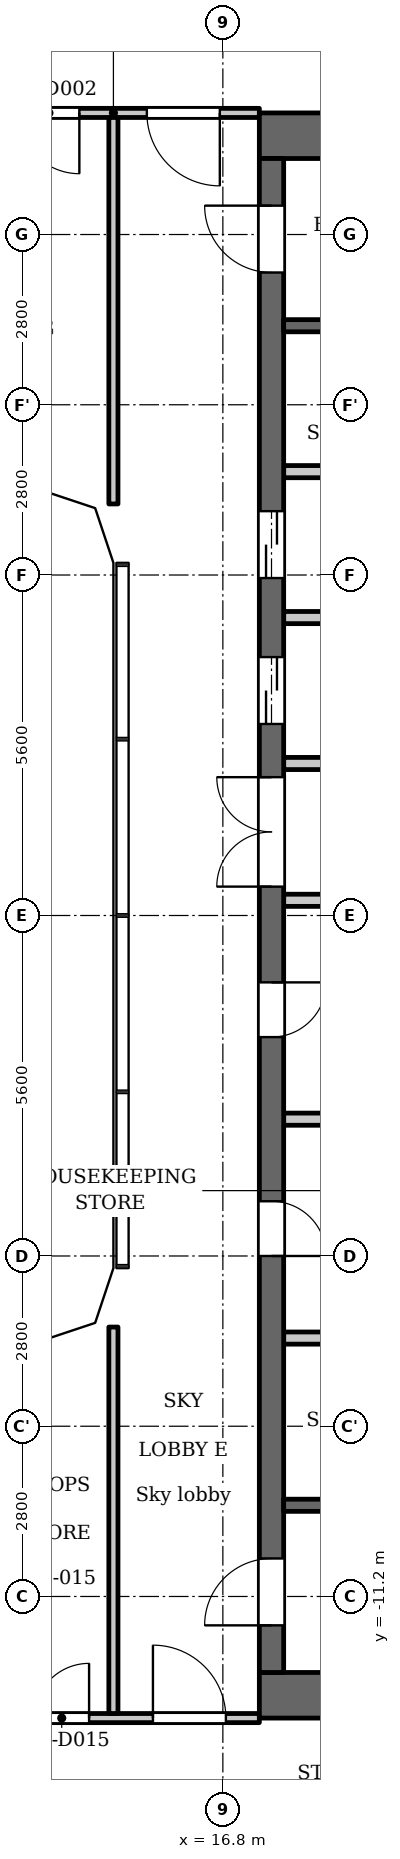
"""IFC4 building model, lengths in metres.
Left out: names, types, materials, properties, quantities, classifications, styles, units other than length and angle.
Written with IfcOpenShell. Run it as: python <this file> out.ifc"""

import sys

from ifc_helpers import new_model, si_unit, direction, frame, frame_2d, origin, place, context, subcontext, project, spatial, polyline, rectangle, outline, extrude, element, fill, save


model = new_model("IFC4")
c1 = context("Model", 3, precision=1e-05, world=origin(), true_north=direction((0.0, 1.0)))
c2 = subcontext(c1, "Body", "Model", "MODEL_VIEW")
j1 = project(units=[si_unit("LENGTHUNIT", "METRE"), si_unit("PLANEANGLEUNIT", "RADIAN")], contexts=[c1])
p1 = place(None, origin())
s1 = spatial("IfcSite", under=j1, at=p1, CompositionType="ELEMENT")
p2 = place(p1, origin())
s2 = spatial("IfcBuilding", under=s1, at=p2, CompositionType="ELEMENT")
p3 = place(p2, frame((0.0, 0.0, 178.1)))
s3 = spatial("IfcBuildingStorey", under=s2, at=p3, CompositionType="ELEMENT", Elevation=178.1)
for number, where, z_axis, x_axis in (
    (1, (17.4, 12.825, 0.0), (0.0, 0.0, 1.0), (1.0, 0.0, 0.0)),
    (2, (17.4, -12.825, 0.0), (0.0, 0.0, 1.0), (1.0, 0.0, 0.0)),
):
    element("IfcWall", number, at=place(p3, frame(where, z_axis=z_axis, x_axis=x_axis)), inside=s3, PredefinedType="SHEAR", context=c2, shape_type="SweptSolid", body=[
        extrude(rectangle(XDim=10.4, YDim=0.75, at=frame_2d((5.2, 0.0))), origin(), (0.0, 0.0, 1.0), 4.95),
    ])
p4 = place(p3, frame((17.8, -3.35, 0.0), z_axis=(0.0, 0.0, 1.0), x_axis=(1.0, 0.0, 0.0)))
e3 = element("IfcWall", 3, at=p4, inside=s3, PredefinedType="PARTITIONING", context=c2, shape_type="SweptSolid", body=[
    extrude(rectangle(XDim=2.8, YDim=0.2, at=frame_2d((1.4, 0.0))), origin(), (0.0, 0.0, 1.0), 4.95),
])
p5 = place(p3, frame((17.6, -12.45, 0.0), z_axis=(0.0, 0.0, 1.0), x_axis=(0.0, 1.0, 0.0)))
e4 = element("IfcWall", 4, at=p5, inside=s3, PredefinedType="SHEAR", context=c2, shape_type="SweptSolid", body=[
    extrude(rectangle(XDim=24.9, YDim=0.4, at=frame_2d((12.45, 0.0))), origin(), (0.0, 0.0, 1.0), 4.95),
])
p6 = place(p5, frame((6.85, 0.0, 0.0)))
e5 = element("IfcOpeningElement", 5, at=p6, cuts=e4, PredefinedType="OPENING", context=c2, shape_type="SweptSolid", body=[
    extrude(rectangle(XDim=0.9, YDim=2.1, at=frame_2d((0.45, 1.05))), frame((0.0, 0.21, 0.0), z_axis=(0.0, -1.0, 0.0), x_axis=(1.0, 0.0, 0.0)), (0.0, 0.0, 1.0), 0.42),
])
p7 = place(p5, frame((10.45, 0.0, 0.0)))
e6 = element("IfcOpeningElement", 6, at=p7, cuts=e4, PredefinedType="OPENING", context=c2, shape_type="SweptSolid", body=[
    extrude(rectangle(XDim=0.9, YDim=2.1, at=frame_2d((0.45, 1.05))), frame((0.0, 0.21, 0.0), z_axis=(0.0, -1.0, 0.0), x_axis=(1.0, 0.0, 0.0)), (0.0, 0.0, 1.0), 0.42),
])
p8 = place(p5, frame((15.6, 0.0, 0.0)))
e7 = element("IfcOpeningElement", 7, at=p8, cuts=e4, PredefinedType="OPENING", context=c2, shape_type="SweptSolid", body=[
    extrude(rectangle(XDim=1.1, YDim=2.1, at=frame_2d((0.55, 1.05))), frame((0.0, 0.21, 0.0), z_axis=(0.0, -1.0, 0.0), x_axis=(1.0, 0.0, 0.0)), (0.0, 0.0, 1.0), 0.42),
])
p9 = place(p5, frame((18.0, 0.0, 0.0)))
e8 = element("IfcOpeningElement", 8, at=p9, cuts=e4, PredefinedType="OPENING", context=c2, shape_type="SweptSolid", body=[
    extrude(rectangle(XDim=1.1, YDim=2.1, at=frame_2d((0.55, 1.05))), frame((0.0, 0.21, 0.0), z_axis=(0.0, -1.0, 0.0), x_axis=(1.0, 0.0, 0.0)), (0.0, 0.0, 1.0), 0.42),
])
p10 = place(p5, frame((23.025, 0.0, 0.0)))
e9 = element("IfcOpeningElement", 9, at=p10, cuts=e4, PredefinedType="OPENING", context=c2, shape_type="SweptSolid", body=[
    extrude(rectangle(XDim=1.1, YDim=2.1, at=frame_2d((0.55, 1.05))), frame((0.0, 0.21, 0.0), z_axis=(0.0, -1.0, 0.0), x_axis=(1.0, 0.0, 0.0)), (0.0, 0.0, 1.0), 0.42),
])
p11 = place(p5, frame((0.775, 0.0, 0.0)))
e10 = element("IfcOpeningElement", 10, at=p11, cuts=e4, PredefinedType="OPENING", context=c2, shape_type="SweptSolid", body=[
    extrude(rectangle(XDim=1.1, YDim=2.1, at=frame_2d((0.55, 1.05))), frame((0.0, 0.21, 0.0), z_axis=(0.0, -1.0, 0.0), x_axis=(1.0, 0.0, 0.0)), (0.0, 0.0, 1.0), 0.42),
])
p12 = place(p5, frame((12.925, 0.0, 0.0)))
e11 = element("IfcOpeningElement", 11, at=p12, cuts=e4, PredefinedType="OPENING", context=c2, shape_type="SweptSolid", body=[
    extrude(rectangle(XDim=1.8, YDim=2.1, at=frame_2d((0.9, 1.05))), frame((0.0, 0.21, 0.0), z_axis=(0.0, -1.0, 0.0), x_axis=(1.0, 0.0, 0.0)), (0.0, 0.0, 1.0), 0.42),
])
p13 = place(p3, frame((17.8, -9.7, 0.0), z_axis=(0.0, 0.0, 1.0), x_axis=(1.0, 0.0, 0.0)))
e12 = element("IfcWall", 12, at=p13, inside=s3, PredefinedType="SHEAR", context=c2, shape_type="SweptSolid", body=[
    extrude(rectangle(XDim=8.45, YDim=0.2, at=frame_2d((4.225, 0.0))), origin(), (0.0, 0.0, 1.0), 4.95),
])
p14 = place(p13, frame((0.85, 0.0, 0.0)))
e13 = element("IfcOpeningElement", 13, at=p14, cuts=e12, PredefinedType="OPENING", context=c2, shape_type="SweptSolid", body=[
    extrude(rectangle(XDim=1.1, YDim=2.1, at=frame_2d((0.55, 1.05))), frame((0.0, 0.11, 0.0), z_axis=(0.0, -1.0, 0.0), x_axis=(1.0, 0.0, 0.0)), (0.0, 0.0, 1.0), 0.22),
])
p15 = place(p13, frame((3.75, 0.0, 0.0)))
e14 = element("IfcOpeningElement", 14, at=p15, cuts=e12, PredefinedType="OPENING", context=c2, shape_type="SweptSolid", body=[
    extrude(rectangle(XDim=1.1, YDim=2.1, at=frame_2d((0.55, 1.05))), frame((0.0, 0.11, 0.0), z_axis=(0.0, -1.0, 0.0), x_axis=(1.0, 0.0, 0.0)), (0.0, 0.0, 1.0), 0.22),
])
p16 = place(p3, frame((17.8, -6.95, 0.0), z_axis=(0.0, 0.0, 1.0), x_axis=(1.0, 0.0, 0.0)))
e15 = element("IfcWall", 15, at=p16, inside=s3, PredefinedType="PARTITIONING", context=c2, shape_type="SweptSolid", body=[
    extrude(rectangle(XDim=2.8, YDim=0.2, at=frame_2d((1.4, 0.0))), origin(), (0.0, 0.0, 1.0), 4.95),
])
for number, where, z_axis, x_axis in (
    (16, (17.8, 0.25, 0.0), (0.0, 0.0, 1.0), (1.0, 0.0, 0.0)),
    (17, (17.8, 2.5, 0.0), (0.0, 0.0, 1.0), (1.0, 0.0, 0.0)),
):
    element("IfcWall", number, at=place(p3, frame(where, z_axis=z_axis, x_axis=x_axis)), inside=s3, PredefinedType="PARTITIONING", context=c2, shape_type="SweptSolid", body=[
        extrude(rectangle(XDim=3.0, YDim=0.2, at=frame_2d((1.5, 0.0))), origin(), (0.0, 0.0, 1.0), 4.95),
    ])
for number, where, z_axis, x_axis in (
    (18, (17.8, 4.9, 0.0), (0.0, 0.0, 1.0), (1.0, 0.0, 0.0)),
    (19, (17.8, 7.3, 0.0), (0.0, 0.0, 1.0), (1.0, 0.0, 0.0)),
):
    element("IfcWall", number, at=place(p3, frame(where, z_axis=z_axis, x_axis=x_axis)), inside=s3, PredefinedType="PARTITIONING", context=c2, shape_type="SweptSolid", body=[
        extrude(rectangle(XDim=2.8, YDim=0.2, at=frame_2d((1.4, 0.0))), origin(), (0.0, 0.0, 1.0), 4.95),
    ])
p17 = place(p3, frame((17.8, 9.7, 0.0), z_axis=(0.0, 0.0, 1.0), x_axis=(1.0, 0.0, 0.0)))
e20 = element("IfcWall", 20, at=p17, inside=s3, PredefinedType="SHEAR", context=c2, shape_type="SweptSolid", body=[
    extrude(rectangle(XDim=8.45, YDim=0.2, at=frame_2d((4.225, 0.0))), origin(), (0.0, 0.0, 1.0), 4.95),
])
p18 = place(p17, frame((0.85, 0.0, 0.0)))
e21 = element("IfcOpeningElement", 21, at=p18, cuts=e20, PredefinedType="OPENING", context=c2, shape_type="SweptSolid", body=[
    extrude(rectangle(XDim=1.1, YDim=2.1, at=frame_2d((0.55, 1.05))), frame((0.0, 0.11, 0.0), z_axis=(0.0, -1.0, 0.0), x_axis=(1.0, 0.0, 0.0)), (0.0, 0.0, 1.0), 0.22),
])
p19 = place(p17, frame((3.75, 0.0, 0.0)))
e22 = element("IfcOpeningElement", 22, at=p19, cuts=e20, PredefinedType="OPENING", context=c2, shape_type="SweptSolid", body=[
    extrude(rectangle(XDim=1.1, YDim=2.1, at=frame_2d((0.55, 1.05))), frame((0.0, 0.11, 0.0), z_axis=(0.0, -1.0, 0.0), x_axis=(1.0, 0.0, 0.0)), (0.0, 0.0, 1.0), 0.22),
])
p20 = place(p3, frame((11.384, -13.2, 0.0), z_axis=(0.0, 0.0, 1.0), x_axis=(1.0, 0.0, 0.0)))
e23 = element("IfcWall", 23, at=p20, inside=s3, PredefinedType="PARTITIONING", context=c2, shape_type="SweptSolid", body=[
    extrude(rectangle(XDim=6.016, YDim=0.15, at=frame_2d((3.008, 0.0))), origin(), (0.0, 0.0, 1.0), 4.95),
])
p21 = place(p20, frame((4.266, 0.0, 0.0)))
e24 = element("IfcOpeningElement", 24, at=p21, cuts=e23, PredefinedType="OPENING", context=c2, shape_type="SweptSolid", body=[
    extrude(rectangle(XDim=1.2, YDim=2.1, at=frame_2d((0.6, 1.05))), frame((0.0, 0.085, 0.0), z_axis=(0.0, -1.0, 0.0), x_axis=(1.0, 0.0, 0.0)), (0.0, 0.0, 1.0), 0.17),
])
p22 = place(p20, frame((0.416, 0.0, 0.0)))
e25 = element("IfcOpeningElement", 25, at=p22, cuts=e23, PredefinedType="OPENING", context=c2, shape_type="SweptSolid", body=[
    extrude(rectangle(XDim=0.9, YDim=2.1, at=frame_2d((0.45, 1.05))), frame((0.0, 0.085, 0.0), z_axis=(0.0, -1.0, 0.0), x_axis=(1.0, 0.0, 0.0)), (0.0, 0.0, 1.0), 0.17),
])
p23 = place(p20, frame((2.316, 0.0, 0.0)))
e26 = element("IfcOpeningElement", 26, at=p23, cuts=e23, PredefinedType="OPENING", context=c2, shape_type="SweptSolid", body=[
    extrude(rectangle(XDim=0.9, YDim=2.1, at=frame_2d((0.45, 1.05))), frame((0.0, 0.085, 0.0), z_axis=(0.0, -1.0, 0.0), x_axis=(1.0, 0.0, 0.0)), (0.0, 0.0, 1.0), 0.17),
])
p24 = place(p3, frame((11.384, 13.2, 0.0), z_axis=(0.0, 0.0, 1.0), x_axis=(1.0, 0.0, 0.0)))
e27 = element("IfcWall", 27, at=p24, inside=s3, PredefinedType="PARTITIONING", context=c2, shape_type="SweptSolid", body=[
    extrude(rectangle(XDim=6.016, YDim=0.15, at=frame_2d((3.008, 0.0))), origin(), (0.0, 0.0, 1.0), 4.95),
])
p25 = place(p24, frame((4.166, 0.0, 0.0)))
e28 = element("IfcOpeningElement", 28, at=p25, cuts=e27, PredefinedType="OPENING", context=c2, shape_type="SweptSolid", body=[
    extrude(rectangle(XDim=1.2, YDim=2.1, at=frame_2d((0.6, 1.05))), frame((0.0, 0.085, 0.0), z_axis=(0.0, -1.0, 0.0), x_axis=(1.0, 0.0, 0.0)), (0.0, 0.0, 1.0), 0.17),
])
p26 = place(p24, frame((2.056, 0.0, 0.0)))
e29 = element("IfcOpeningElement", 29, at=p26, cuts=e27, PredefinedType="OPENING", context=c2, shape_type="SweptSolid", body=[
    extrude(rectangle(XDim=1.0, YDim=2.1, at=frame_2d((0.5, 1.05))), frame((0.0, 0.085, 0.0), z_axis=(0.0, -1.0, 0.0), x_axis=(1.0, 0.0, 0.0)), (0.0, 0.0, 1.0), 0.17),
])
for number, where, z_axis, x_axis in (
    (30, (15.0, -13.125, 0.0), (0.0, 0.0, 1.0), (0.0, 1.0, 0.0)),
    (31, (15.0, 6.769, 0.0), (0.0, 0.0, 1.0), (0.0, 1.0, 0.0)),
):
    element("IfcWall", number, at=place(p3, frame(where, z_axis=z_axis, x_axis=x_axis)), inside=s3, PredefinedType="PARTITIONING", context=c2, shape_type="SweptSolid", body=[
        extrude(rectangle(XDim=6.356, YDim=0.15, at=frame_2d((3.178, 0.0))), origin(), (0.0, 0.0, 1.0), 4.95),
    ])
p27 = place(p3, origin())
e32 = element("IfcWall", 32, at=p27, inside=s3, PredefinedType="SOLIDWALL", context=c2, shape_type="SweptSolid", body=[
    extrude(outline(polyline([(13.8, 7.0), (14.7, 6.7), (15.0, 5.8), (15.3, 5.8), (15.3, 5.849), (14.937, 6.937), (13.849, 7.3), (13.8, 7.3), (13.8, 7.0)])), origin(), (0.0, 0.0, 1.0), 4.95),
])
e33 = element("IfcWall", 33, at=p27, inside=s3, PredefinedType="SOLIDWALL", context=c2, shape_type="SweptSolid", body=[
    extrude(outline(polyline([(15.0, -5.8), (14.7, -6.7), (13.8, -7.0), (13.8, -7.3), (13.849, -7.3), (14.937, -6.937), (15.3, -5.849), (15.3, -5.8), (15.0, -5.8)])), origin(), (0.0, 0.0, 1.0), 4.95),
])
p28 = place(p6, origin())
e34 = element("IfcDoor", 34, at=p28, inside=s3, OperationType="SINGLE_SWING_LEFT", PredefinedType="DOOR", context=c2, shape_type="SweptSolid", body=[
    extrude(rectangle(XDim=0.9, YDim=2.1, at=frame_2d((0.45, 1.05))), frame((0.0, 0.025, 0.0), z_axis=(0.0, -1.0, 0.0), x_axis=(1.0, 0.0, 0.0)), (0.0, 0.0, 1.0), 0.05),
])
fill(e5, e34)
p29 = place(p7, origin())
e35 = element("IfcDoor", 35, at=p29, inside=s3, OperationType="SINGLE_SWING_RIGHT", PredefinedType="DOOR", context=c2, shape_type="SweptSolid", body=[
    extrude(rectangle(XDim=0.9, YDim=2.1, at=frame_2d((0.45, 1.05))), frame((0.0, 0.025, 0.0), z_axis=(0.0, -1.0, 0.0), x_axis=(1.0, 0.0, 0.0)), (0.0, 0.0, 1.0), 0.05),
])
fill(e6, e35)
p30 = place(p8, origin())
e36 = element("IfcDoor", 36, at=p30, inside=s3, OperationType="DOUBLE_DOOR_SLIDING", PredefinedType="DOOR", context=c2, shape_type="SweptSolid", body=[
    extrude(rectangle(XDim=1.1, YDim=2.1, at=frame_2d((0.55, 1.05))), frame((0.0, 0.025, 0.0), z_axis=(0.0, -1.0, 0.0), x_axis=(1.0, 0.0, 0.0)), (0.0, 0.0, 1.0), 0.05),
])
fill(e7, e36)
p31 = place(p9, origin())
e37 = element("IfcDoor", 37, at=p31, inside=s3, OperationType="DOUBLE_DOOR_SLIDING", PredefinedType="DOOR", context=c2, shape_type="SweptSolid", body=[
    extrude(rectangle(XDim=1.1, YDim=2.1, at=frame_2d((0.55, 1.05))), frame((0.0, 0.025, 0.0), z_axis=(0.0, -1.0, 0.0), x_axis=(1.0, 0.0, 0.0)), (0.0, 0.0, 1.0), 0.05),
])
fill(e8, e37)
p32 = place(p10, origin())
e38 = element("IfcDoor", 38, at=p32, inside=s3, OperationType="SINGLE_SWING_LEFT", PredefinedType="DOOR", context=c2, shape_type="SweptSolid", body=[
    extrude(rectangle(XDim=1.1, YDim=2.1, at=frame_2d((0.55, 1.05))), frame((0.0, 0.025, 0.0), z_axis=(0.0, -1.0, 0.0), x_axis=(1.0, 0.0, 0.0)), (0.0, 0.0, 1.0), 0.05),
])
fill(e9, e38)
p33 = place(p11, origin())
e39 = element("IfcDoor", 39, at=p33, inside=s3, OperationType="SINGLE_SWING_RIGHT", PredefinedType="DOOR", context=c2, shape_type="SweptSolid", body=[
    extrude(rectangle(XDim=1.1, YDim=2.1, at=frame_2d((0.55, 1.05))), frame((0.0, 0.025, 0.0), z_axis=(0.0, -1.0, 0.0), x_axis=(1.0, 0.0, 0.0)), (0.0, 0.0, 1.0), 0.05),
])
fill(e10, e39)
p34 = place(p12, origin())
e40 = element("IfcDoor", 40, at=p34, inside=s3, OperationType="DOUBLE_DOOR_SINGLE_SWING", PredefinedType="DOOR", context=c2, shape_type="SweptSolid", body=[
    extrude(rectangle(XDim=1.8, YDim=2.1, at=frame_2d((0.9, 1.05))), frame((0.0, 0.025, 0.0), z_axis=(0.0, -1.0, 0.0), x_axis=(1.0, 0.0, 0.0)), (0.0, 0.0, 1.0), 0.05),
])
fill(e11, e40)
p35 = place(p25, origin())
e41 = element("IfcDoor", 41, at=p35, inside=s3, OperationType="SINGLE_SWING_RIGHT", PredefinedType="DOOR", context=c2, shape_type="SweptSolid", body=[
    extrude(rectangle(XDim=1.2, YDim=2.1, at=frame_2d((0.6, 1.05))), frame((0.0, 0.025, 0.0), z_axis=(0.0, -1.0, 0.0), x_axis=(1.0, 0.0, 0.0)), (0.0, 0.0, 1.0), 0.05),
])
fill(e28, e41)
p36 = place(p26, origin())
e42 = element("IfcDoor", 42, at=p36, inside=s3, OperationType="SINGLE_SWING_RIGHT", PredefinedType="DOOR", context=c2, shape_type="SweptSolid", body=[
    extrude(rectangle(XDim=1.0, YDim=2.1, at=frame_2d((0.5, 1.05))), frame((0.0, 0.025, 0.0), z_axis=(0.0, -1.0, 0.0), x_axis=(1.0, 0.0, 0.0)), (0.0, 0.0, 1.0), 0.05),
])
fill(e29, e42)
p37 = place(p21, origin())
e43 = element("IfcDoor", 43, at=p37, inside=s3, OperationType="SINGLE_SWING_RIGHT", PredefinedType="DOOR", context=c2, shape_type="SweptSolid", body=[
    extrude(rectangle(XDim=1.2, YDim=2.1, at=frame_2d((0.6, 1.05))), frame((0.0, 0.025, 0.0), z_axis=(0.0, -1.0, 0.0), x_axis=(1.0, 0.0, 0.0)), (0.0, 0.0, 1.0), 0.05),
])
fill(e24, e43)
p38 = place(p23, origin())
e44 = element("IfcDoor", 44, at=p38, inside=s3, OperationType="SINGLE_SWING_LEFT", PredefinedType="DOOR", context=c2, shape_type="SweptSolid", body=[
    extrude(rectangle(XDim=0.9, YDim=2.1, at=frame_2d((0.45, 1.05))), frame((0.0, 0.025, 0.0), z_axis=(0.0, -1.0, 0.0), x_axis=(1.0, 0.0, 0.0)), (0.0, 0.0, 1.0), 0.05),
])
fill(e26, e44)
save(model, sys.argv[1])
